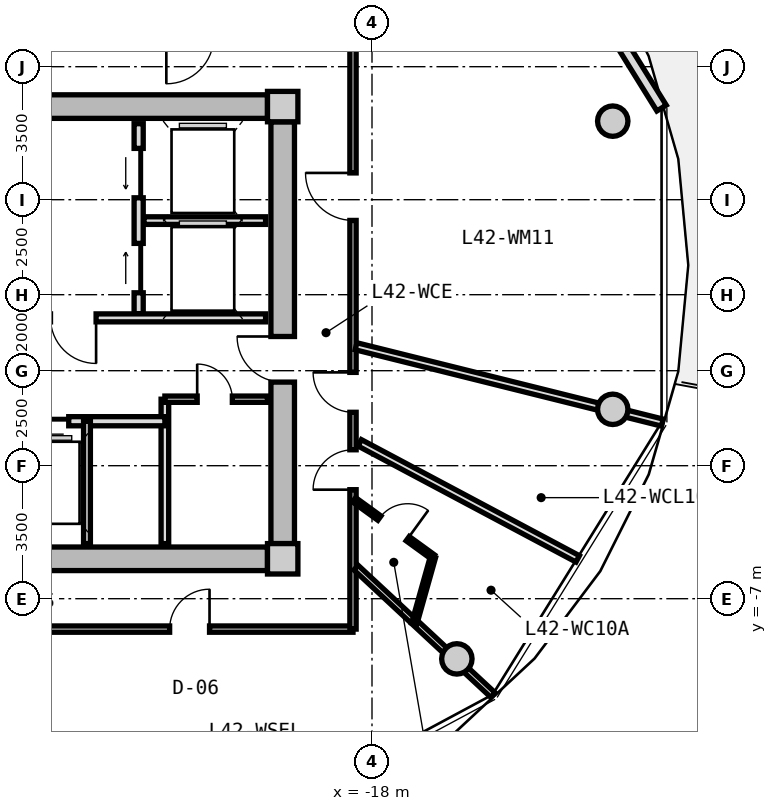
"""IFC4 building model, lengths in metres.
Left out: names, types, materials, properties, quantities, classifications, styles, units other than length and angle.
Written with IfcOpenShell. Run it as: python <this file> out.ifc"""

import sys

from ifc_helpers import new_model, si_unit, direction, frame, frame_2d, origin, origin_2d, place, context, subcontext, project, spatial, rectangle, circle, extrude, source, transform, mapped, element, fill, save


model = new_model("IFC4")
c1 = context("Model", 3, precision=1e-05, world=origin(), true_north=direction((0.0, 1.0)))
c2 = subcontext(c1, "Body", "Model", "MODEL_VIEW")
j1 = project(units=[si_unit("LENGTHUNIT", "METRE"), si_unit("PLANEANGLEUNIT", "RADIAN")], contexts=[c1])
p1 = place(None, origin())
s1 = spatial("IfcSite", under=j1, at=p1, CompositionType="ELEMENT")
p2 = place(p1, origin())
s2 = spatial("IfcBuilding", under=s1, at=p2, CompositionType="ELEMENT")
p3 = place(p2, frame((0.0, 0.0, 137.35)))
s3 = spatial("IfcBuildingStorey", under=s2, at=p3, CompositionType="ELEMENT", Elevation=137.35)
m1 = source(origin(), c2, "Body", "SweptSolid", [
    extrude(rectangle(XDim=0.8, YDim=0.8, at=origin_2d()), origin(), (0.0, 0.0, 1.0), 3.05),
])
for number, where, z_axis, x_axis in (
    (1, (-20.35, -5.95, 0.0), (0.0, 0.0, 1.0), (1.0, 0.0, 0.0)),
    (2, (-20.35, 5.95, 0.0), (0.0, 0.0, 1.0), (1.0, 0.0, 0.0)),
):
    element("IfcColumn", number, at=place(p3, frame(where, z_axis=z_axis, x_axis=x_axis)), inside=s3, PredefinedType="COLUMN", context=c2, shape_type="MappedRepresentation", body=[
        mapped(m1, transform((0.0, 0.0, 0.0), x_axis=(1.0, 0.0, 0.0), y_axis=(0.0, 1.0, 0.0), z_axis=(0.0, 0.0, 1.0), scale=1.0)),
    ])
m2 = source(origin(), c2, "Body", "SweptSolid", [
    extrude(rectangle(XDim=14.5, YDim=0.62, at=frame_2d((7.25, 0.0))), origin(), (0.0, 0.0, 1.0), 2.81),
])
for number, where, z_axis, x_axis in (
    (3, (-35.25, 5.95, 0.0), (0.0, 0.0, 1.0), (1.0, 0.0, 0.0)),
    (4, (-20.75, -5.95, 0.0), (0.0, 0.0, 1.0), (-1.0, 0.0, 0.0)),
):
    element("IfcWall", number, at=place(p3, frame(where, z_axis=z_axis, x_axis=x_axis)), inside=s3, PredefinedType="SHEAR", context=c2, shape_type="MappedRepresentation", body=[
        mapped(m2, transform((0.0, 0.0, 0.0), x_axis=(1.0, 0.0, 0.0), y_axis=(0.0, 1.0, 0.0), z_axis=(0.0, 0.0, 1.0), scale=1.0)),
    ])
m3 = source(origin(), c2, "Body", "SweptSolid", [
    extrude(rectangle(XDim=11.1, YDim=0.62, at=frame_2d((5.55, 0.0))), origin(), (0.0, 0.0, 1.0), 2.81),
])
p4 = place(p3, frame((-20.35, 5.55, 0.0), z_axis=(0.0, 0.0, 1.0), x_axis=(0.0, -1.0, 0.0)))
e5 = element("IfcWall", 5, at=p4, inside=s3, PredefinedType="SHEAR", context=c2, shape_type="MappedRepresentation", body=[
    mapped(m3, transform((0.0, 0.0, 0.0), x_axis=(1.0, 0.0, 0.0), y_axis=(0.0, 1.0, 0.0), z_axis=(0.0, 0.0, 1.0), scale=1.0)),
])
p5 = place(p4, frame((5.65, 0.0, 0.0)))
e6 = element("IfcOpeningElement", 6, at=p5, cuts=e5, PredefinedType="OPENING", context=c2, shape_type="SweptSolid", body=[
    extrude(rectangle(XDim=1.2, YDim=2.15, at=frame_2d((0.6, 1.075))), frame((0.0, 0.32, 0.0), z_axis=(0.0, -1.0, 0.0), x_axis=(1.0, 0.0, 0.0)), (0.0, 0.0, 1.0), 0.64),
])
m4 = source(origin(), c2, "Body", "SweptSolid", [
    extrude(circle(Radius=0.4, at=origin_2d()), origin(), (0.0, 0.0, 1.0), 3.05),
])
for number, where, z_axis, x_axis in (
    (7, (-11.665, 5.567, 0.0), (0.0, 0.0, 1.0), (1.0, 0.0, 0.0)),
    (8, (-15.767, -8.584, 0.0), (0.0, 0.0, 1.0), (1.0, 0.0, 0.0)),
    (9, (-11.665, -2.016, 0.0), (0.0, 0.0, 1.0), (1.0, 0.0, 0.0)),
):
    element("IfcColumn", number, at=place(p3, frame(where, z_axis=z_axis, x_axis=x_axis)), inside=s3, PredefinedType="COLUMN", context=c2, shape_type="MappedRepresentation", body=[
        mapped(m4, transform((0.0, 0.0, 0.0), x_axis=(1.0, 0.0, 0.0), y_axis=(0.0, 1.0, 0.0), z_axis=(0.0, 0.0, 1.0), scale=1.0)),
    ])
m5 = source(origin(), c2, "Body", "SweptSolid", [
    extrude(rectangle(XDim=8.431, YDim=0.29, at=frame_2d((4.216, 0.0))), origin(), (0.0, 0.0, 1.0), 2.81),
])
p6 = place(p3, frame((-14.827, 13.075, 0.0), z_axis=(0.0, 0.0, 1.0), x_axis=(0.527377998418, -0.849630770855, 0.0)))
e10 = element("IfcWall", 10, at=p6, inside=s3, PredefinedType="SOLIDWALL", context=c2, shape_type="MappedRepresentation", body=[
    mapped(m5, transform((0.0, 0.0, 0.0), x_axis=(1.0, 0.0, 0.0), y_axis=(0.0, 1.0, 0.0), z_axis=(0.0, 0.0, 1.0), scale=1.0)),
])
p7 = place(p6, frame((0.9, 0.0, 0.0)))
e11 = element("IfcOpeningElement", 11, at=p7, cuts=e10, PredefinedType="OPENING", context=c2, shape_type="SweptSolid", body=[
    extrude(rectangle(XDim=1.15, YDim=2.25, at=frame_2d((0.575, 1.125))), frame((0.0, 0.155, 0.0), z_axis=(0.0, -1.0, 0.0), x_axis=(1.0, 0.0, 0.0)), (0.0, 0.0, 1.0), 0.31),
])
p8 = place(p6, frame((4.566, 0.0, 0.85)))
e12 = element("IfcOpeningElement", 12, at=p8, cuts=e10, PredefinedType="OPENING", context=c2, shape_type="SweptSolid", body=[
    extrude(rectangle(XDim=1.2, YDim=1.5, at=frame_2d((0.6, 0.75))), frame((0.0, 0.155, 0.0), z_axis=(0.0, -1.0, 0.0), x_axis=(1.0, 0.0, 0.0)), (0.0, 0.0, 1.0), 0.31),
])
m6 = source(origin(), c2, "Body", "SweptSolid", [
    extrude(rectangle(XDim=5.0, YDim=0.24, at=frame_2d((2.5, 0.0))), origin(), (0.0, 0.0, 1.0), 2.795),
])
p9 = place(p3, frame((-24.14, 0.5, 0.0), z_axis=(0.0, 0.0, 1.0), x_axis=(0.0, 1.0, 0.0)))
e13 = element("IfcWall", 13, at=p9, inside=s3, PredefinedType="PARTITIONING", context=c2, shape_type="MappedRepresentation", body=[
    mapped(m6, transform((0.0, 0.0, 0.0), x_axis=(1.0, 0.0, 0.0), y_axis=(0.0, 1.0, 0.0), z_axis=(0.0, 0.0, 1.0), scale=1.0)),
])
p10 = place(p9, frame((3.05, 0.0, 0.0)))
e14 = element("IfcOpeningElement", 14, at=p10, cuts=e13, PredefinedType="OPENING", context=c2, shape_type="SweptSolid", body=[
    extrude(rectangle(XDim=1.3, YDim=2.2, at=frame_2d((0.65, 1.1))), frame((0.0, 0.13, 0.0), z_axis=(0.0, -1.0, 0.0), x_axis=(1.0, 0.0, 0.0)), (0.0, 0.0, 1.0), 0.26),
])
p11 = place(p9, frame((0.55, 0.0, 0.0)))
e15 = element("IfcOpeningElement", 15, at=p11, cuts=e13, PredefinedType="OPENING", context=c2, shape_type="SweptSolid", body=[
    extrude(rectangle(XDim=1.3, YDim=2.2, at=frame_2d((0.65, 1.1))), frame((0.0, 0.13, 0.0), z_axis=(0.0, -1.0, 0.0), x_axis=(1.0, 0.0, 0.0)), (0.0, 0.0, 1.0), 0.26),
])
m7 = source(origin(), c2, "Body", "SweptSolid", [
    extrude(rectangle(XDim=3.2, YDim=0.2, at=frame_2d((1.6, 0.0))), origin(), (0.0, 0.0, 1.0), 2.795),
])
p12 = place(p3, frame((-24.0, 2.95, 0.0), z_axis=(0.0, 0.0, 1.0), x_axis=(1.0, 0.0, 0.0)))
e16 = element("IfcWall", 16, at=p12, inside=s3, PredefinedType="PARTITIONING", context=c2, shape_type="MappedRepresentation", body=[
    mapped(m7, transform((0.0, 0.0, 0.0), x_axis=(1.0, 0.0, 0.0), y_axis=(0.0, 1.0, 0.0), z_axis=(0.0, 0.0, 1.0), scale=1.0)),
])
m8 = source(origin(), c2, "Body", "SweptSolid", [
    extrude(rectangle(XDim=6.66, YDim=0.21, at=frame_2d((3.33, 0.0))), origin(), (0.0, 0.0, 1.0), 2.795),
])
p13 = place(p3, frame((-27.46, 0.39, 0.0), z_axis=(0.0, 0.0, 1.0), x_axis=(1.0, 0.0, 0.0)))
e17 = element("IfcWall", 17, at=p13, inside=s3, PredefinedType="PARTITIONING", context=c2, shape_type="MappedRepresentation", body=[
    mapped(m8, transform((0.0, 0.0, 0.0), x_axis=(1.0, 0.0, 0.0), y_axis=(0.0, 1.0, 0.0), z_axis=(0.0, 0.0, 1.0), scale=1.0)),
])
p14 = place(p13, frame((1.0, 0.0, 0.0)))
e18 = element("IfcOpeningElement", 18, at=p14, cuts=e17, PredefinedType="OPENING", context=c2, shape_type="SweptSolid", body=[
    extrude(rectangle(XDim=1.2, YDim=2.15, at=frame_2d((0.6, 1.075))), frame((0.0, 0.115, 0.0), z_axis=(0.0, -1.0, 0.0), x_axis=(1.0, 0.0, 0.0)), (0.0, 0.0, 1.0), 0.23),
])
m9 = source(origin(), c2, "Body", "SweptSolid", [
    extrude(rectangle(XDim=3.8, YDim=0.2, at=frame_2d((1.9, 0.0))), origin(), (0.0, 0.0, 1.0), 2.795),
])
p15 = place(p3, frame((-23.45, -5.55, 0.0), z_axis=(0.0, 0.0, 1.0), x_axis=(0.0, 1.0, 0.0)))
e19 = element("IfcWall", 19, at=p15, inside=s3, PredefinedType="PARTITIONING", context=c2, shape_type="MappedRepresentation", body=[
    mapped(m9, transform((0.0, 0.0, 0.0), x_axis=(1.0, 0.0, 0.0), y_axis=(0.0, 1.0, 0.0), z_axis=(0.0, 0.0, 1.0), scale=1.0)),
])
m10 = source(origin(), c2, "Body", "SweptSolid", [
    extrude(rectangle(XDim=4.13, YDim=0.24, at=frame_2d((2.065, 0.0))), origin(), (0.0, 0.0, 1.0), 2.795),
])
p16 = place(p3, frame((-27.58, -2.33, 0.0), z_axis=(0.0, 0.0, 1.0), x_axis=(1.0, 0.0, 0.0)))
e20 = element("IfcWall", 20, at=p16, inside=s3, PredefinedType="PARTITIONING", context=c2, shape_type="MappedRepresentation", body=[
    mapped(m10, transform((0.0, 0.0, 0.0), x_axis=(1.0, 0.0, 0.0), y_axis=(0.0, 1.0, 0.0), z_axis=(0.0, 0.0, 1.0), scale=1.0)),
])
p17 = place(p16, frame((0.5, 0.0, 0.0)))
e21 = element("IfcOpeningElement", 21, at=p17, cuts=e20, PredefinedType="OPENING", context=c2, shape_type="SweptSolid", body=[
    extrude(rectangle(XDim=1.1, YDim=2.2, at=frame_2d((0.55, 1.1))), frame((0.0, 0.13, 0.0), z_axis=(0.0, -1.0, 0.0), x_axis=(1.0, 0.0, 0.0)), (0.0, 0.0, 1.0), 0.26),
])
m11 = source(origin(), c2, "Body", "SweptSolid", [
    extrude(rectangle(XDim=3.22, YDim=0.18, at=frame_2d((1.61, 0.0))), origin(), (0.0, 0.0, 1.0), 2.795),
])
p18 = place(p3, frame((-25.5, -5.55, 0.0), z_axis=(0.0, 0.0, 1.0), x_axis=(0.0, 1.0, 0.0)))
e22 = element("IfcWall", 22, at=p18, inside=s3, PredefinedType="PARTITIONING", context=c2, shape_type="MappedRepresentation", body=[
    mapped(m11, transform((0.0, 0.0, 0.0), x_axis=(1.0, 0.0, 0.0), y_axis=(0.0, 1.0, 0.0), z_axis=(0.0, 0.0, 1.0), scale=1.0)),
])
m12 = source(origin(), c2, "Body", "SweptSolid", [
    extrude(rectangle(XDim=2.7, YDim=0.165, at=frame_2d((1.35, 0.0))), origin(), (0.0, 0.0, 1.0), 2.795),
])
p19 = place(p3, frame((-23.45, -1.75, 0.0), z_axis=(0.0, 0.0, 1.0), x_axis=(1.0, 0.0, 0.0)))
e23 = element("IfcWall", 23, at=p19, inside=s3, PredefinedType="PARTITIONING", context=c2, shape_type="MappedRepresentation", body=[
    mapped(m12, transform((0.0, 0.0, 0.0), x_axis=(1.0, 0.0, 0.0), y_axis=(0.0, 1.0, 0.0), z_axis=(0.0, 0.0, 1.0), scale=1.0)),
])
p20 = place(p19, frame((0.85, 0.0, 0.0)))
e24 = element("IfcOpeningElement", 24, at=p20, cuts=e23, PredefinedType="OPENING", context=c2, shape_type="SweptSolid", body=[
    extrude(rectangle(XDim=0.925, YDim=2.1, at=frame_2d((0.462, 1.05))), frame((0.0, 0.093, 0.0), z_axis=(0.0, -1.0, 0.0), x_axis=(1.0, 0.0, 0.0)), (0.0, 0.0, 1.0), 0.185),
])
m13 = source(origin(), c2, "Body", "SweptSolid", [
    extrude(rectangle(XDim=8.6, YDim=0.165, at=frame_2d((4.3, 0.0))), origin(), (0.0, 0.0, 1.0), 2.795),
])
p21 = place(p3, frame((-18.5, -7.8, 0.0), z_axis=(0.0, 0.0, 1.0), x_axis=(-1.0, 0.0, 0.0)))
e25 = element("IfcWall", 25, at=p21, inside=s3, PredefinedType="PARTITIONING", context=c2, shape_type="MappedRepresentation", body=[
    mapped(m13, transform((0.0, 0.0, 0.0), x_axis=(1.0, 0.0, 0.0), y_axis=(0.0, 1.0, 0.0), z_axis=(0.0, 0.0, 1.0), scale=1.0)),
])
p22 = place(p21, frame((3.775, 0.0, 0.0)))
e26 = element("IfcOpeningElement", 26, at=p22, cuts=e25, PredefinedType="OPENING", context=c2, shape_type="SweptSolid", body=[
    extrude(rectangle(XDim=1.05, YDim=2.15, at=frame_2d((0.525, 1.075))), frame((0.0, 0.093, 0.0), z_axis=(0.0, -1.0, 0.0), x_axis=(1.0, 0.0, 0.0)), (0.0, 0.0, 1.0), 0.185),
])
m14 = source(origin(), c2, "Body", "SweptSolid", [
    extrude(rectangle(XDim=15.6, YDim=0.165, at=frame_2d((7.8, 0.0))), origin(), (0.0, 0.0, 1.0), 2.795),
])
p23 = place(p3, frame((-18.5, 7.8, 0.0), z_axis=(0.0, 0.0, 1.0), x_axis=(0.0, -1.0, 0.0)))
e27 = element("IfcWall", 27, at=p23, inside=s3, PredefinedType="PARTITIONING", context=c2, shape_type="MappedRepresentation", body=[
    mapped(m14, transform((0.0, 0.0, 0.0), x_axis=(1.0, 0.0, 0.0), y_axis=(0.0, 1.0, 0.0), z_axis=(0.0, 0.0, 1.0), scale=1.0)),
])
p24 = place(p23, frame((10.881, 0.0, 0.0)))
e28 = element("IfcOpeningElement", 28, at=p24, cuts=e27, PredefinedType="OPENING", context=c2, shape_type="SweptSolid", body=[
    extrude(rectangle(XDim=1.05, YDim=2.15, at=frame_2d((0.525, 1.075))), frame((0.0, 0.093, 0.0), z_axis=(0.0, -1.0, 0.0), x_axis=(1.0, 0.0, 0.0)), (0.0, 0.0, 1.0), 0.185),
])
p25 = place(p23, frame((8.844, 0.0, 0.0)))
e29 = element("IfcOpeningElement", 29, at=p25, cuts=e27, PredefinedType="OPENING", context=c2, shape_type="SweptSolid", body=[
    extrude(rectangle(XDim=1.05, YDim=2.15, at=frame_2d((0.525, 1.075))), frame((0.0, 0.093, 0.0), z_axis=(0.0, -1.0, 0.0), x_axis=(1.0, 0.0, 0.0)), (0.0, 0.0, 1.0), 0.185),
])
p26 = place(p23, frame((3.596, 0.0, 0.0)))
e30 = element("IfcOpeningElement", 30, at=p26, cuts=e27, PredefinedType="OPENING", context=c2, shape_type="SweptSolid", body=[
    extrude(rectangle(XDim=1.25, YDim=2.2, at=frame_2d((0.625, 1.1))), frame((0.0, 0.093, 0.0), z_axis=(0.0, -1.0, 0.0), x_axis=(1.0, 0.0, 0.0)), (0.0, 0.0, 1.0), 0.185),
])
m15 = source(origin(), c2, "Body", "SweptSolid", [
    extrude(rectangle(XDim=4.927, YDim=0.165, at=frame_2d((2.463, 0.0))), origin(), (0.0, 0.0, 1.0), 2.345),
])
p27 = place(p3, frame((-18.42, -6.183, 0.0), z_axis=(0.0, 0.0, 1.0), x_axis=(0.732191335987, -0.681098999783, 0.0)))
e31 = element("IfcWall", 31, at=p27, inside=s3, PredefinedType="PARTITIONING", context=c2, shape_type="MappedRepresentation", body=[
    mapped(m15, transform((0.0, 0.0, 0.0), x_axis=(1.0, 0.0, 0.0), y_axis=(0.0, 1.0, 0.0), z_axis=(0.0, 0.0, 1.0), scale=1.0)),
])
m16 = source(origin(), c2, "Body", "SweptSolid", [
    extrude(rectangle(XDim=8.305, YDim=0.19, at=frame_2d((4.153, 0.0))), origin(), (0.0, 0.0, 1.0), 2.345),
])
p28 = place(p3, frame((-18.42, -0.357, 0.0), z_axis=(0.0, 0.0, 1.0), x_axis=(0.970309994378, -0.241864662175, 0.0)))
e32 = element("IfcWall", 32, at=p28, inside=s3, PredefinedType="PARTITIONING", context=c2, shape_type="MappedRepresentation", body=[
    mapped(m16, transform((0.0, 0.0, 0.0), x_axis=(1.0, 0.0, 0.0), y_axis=(0.0, 1.0, 0.0), z_axis=(0.0, 0.0, 1.0), scale=1.0)),
])
m17 = source(origin(), c2, "Body", "SweptSolid", [
    extrude(rectangle(XDim=6.499, YDim=0.19, at=frame_2d((3.25, 0.0))), origin(), (0.0, 0.0, 1.0), 2.795),
])
p29 = place(p3, frame((-18.324, -2.898, 0.0), z_axis=(0.0, 0.0, 1.0), x_axis=(0.882700013711, -0.469936895545, 0.0)))
e33 = element("IfcWall", 33, at=p29, inside=s3, PredefinedType="PARTITIONING", context=c2, shape_type="MappedRepresentation", body=[
    mapped(m17, transform((0.0, 0.0, 0.0), x_axis=(1.0, 0.0, 0.0), y_axis=(0.0, 1.0, 0.0), z_axis=(0.0, 0.0, 1.0), scale=1.0)),
])
m18 = source(origin(), c2, "Body", "SweptSolid", [
    extrude(rectangle(XDim=2.563, YDim=0.14, at=frame_2d((1.282, 0.0))), origin(), (0.0, 0.0, 1.0), 2.795),
])
p30 = place(p3, frame((-18.47, -4.397, 0.0), z_axis=(0.0, 0.0, 1.0), x_axis=(0.809308208957, -0.587384220859, 0.0)))
e34 = element("IfcWall", 34, at=p30, inside=s3, PredefinedType="PARTITIONING", context=c2, shape_type="MappedRepresentation", body=[
    mapped(m18, transform((0.0, 0.0, 0.0), x_axis=(1.0, 0.0, 0.0), y_axis=(0.0, 1.0, 0.0), z_axis=(0.0, 0.0, 1.0), scale=1.0)),
])
p31 = place(p30, frame((0.822, 0.0, 0.0)))
e35 = element("IfcOpeningElement", 35, at=p31, cuts=e34, PredefinedType="OPENING", context=c2, shape_type="SweptSolid", body=[
    extrude(rectangle(XDim=0.92, YDim=2.1, at=frame_2d((0.46, 1.05))), frame((0.0, 0.08, 0.0), z_axis=(0.0, -1.0, 0.0), x_axis=(1.0, 0.0, 0.0)), (0.0, 0.0, 1.0), 0.16),
])
m19 = source(origin(), c2, "Body", "SweptSolid", [
    extrude(rectangle(XDim=1.826, YDim=0.14, at=frame_2d((0.913, 0.0))), origin(), (0.0, 0.0, 1.0), 2.435),
])
p32 = place(p3, frame((-16.396, -5.903, 0.0), z_axis=(0.0, 0.0, 1.0), x_axis=(-0.270745576918, -0.962650940154, 0.0)))
e36 = element("IfcWall", 36, at=p32, inside=s3, PredefinedType="PARTITIONING", context=c2, shape_type="MappedRepresentation", body=[
    mapped(m19, transform((0.0, 0.0, 0.0), x_axis=(1.0, 0.0, 0.0), y_axis=(0.0, 1.0, 0.0), z_axis=(0.0, 0.0, 1.0), scale=1.0)),
])
m20 = source(origin(), c2, "Body", "SweptSolid", [
    extrude(rectangle(XDim=1.3, YDim=2.2, at=frame_2d((0.65, 1.1))), frame((0.0, 0.025, 0.0), z_axis=(0.0, -1.0, 0.0), x_axis=(1.0, 0.0, 0.0)), (0.0, 0.0, 1.0), 0.05),
])
p33 = place(p10, origin())
e37 = element("IfcDoor", 37, at=p33, inside=s3, OperationType="SLIDING_TO_LEFT", PredefinedType="DOOR", context=c2, shape_type="MappedRepresentation", body=[
    mapped(m20, transform((0.0, 0.0, 0.0), x_axis=(1.0, 0.0, 0.0), y_axis=(0.0, 1.0, 0.0), z_axis=(0.0, 0.0, 1.0), scale=1.0)),
])
fill(e14, e37)
p34 = place(p11, origin())
e38 = element("IfcDoor", 38, at=p34, inside=s3, OperationType="SLIDING_TO_RIGHT", PredefinedType="DOOR", context=c2, shape_type="MappedRepresentation", body=[
    mapped(m20, transform((0.0, 0.0, 0.0), x_axis=(1.0, 0.0, 0.0), y_axis=(0.0, 1.0, 0.0), z_axis=(0.0, 0.0, 1.0), scale=1.0)),
])
fill(e15, e38)
m21 = source(origin(), c2, "Body", "SweptSolid", [
    extrude(rectangle(XDim=1.2, YDim=2.15, at=frame_2d((0.6, 1.075))), frame((0.0, 0.025, 0.0), z_axis=(0.0, -1.0, 0.0), x_axis=(1.0, 0.0, 0.0)), (0.0, 0.0, 1.0), 0.05),
])
p35 = place(p14, frame((1.2, 0.0, 0.0), z_axis=(0.0, 0.0, 1.0), x_axis=(-1.0, 0.0, 0.0)))
e39 = element("IfcDoor", 39, at=p35, inside=s3, OperationType="SINGLE_SWING_LEFT", PredefinedType="DOOR", context=c2, shape_type="MappedRepresentation", body=[
    mapped(m21, transform((0.0, 0.0, 0.0), x_axis=(1.0, 0.0, 0.0), y_axis=(0.0, 1.0, 0.0), z_axis=(0.0, 0.0, 1.0), scale=1.0)),
])
fill(e18, e39)
p36 = place(p5, frame((1.2, 0.0, 0.0), z_axis=(0.0, 0.0, 1.0), x_axis=(-1.0, 0.0, 0.0)))
e40 = element("IfcDoor", 40, at=p36, inside=s3, OperationType="SINGLE_SWING_RIGHT", PredefinedType="DOOR", context=c2, shape_type="MappedRepresentation", body=[
    mapped(m21, transform((0.0, 0.0, 0.0), x_axis=(1.0, 0.0, 0.0), y_axis=(0.0, 1.0, 0.0), z_axis=(0.0, 0.0, 1.0), scale=1.0)),
])
fill(e6, e40)
m22 = source(origin(), c2, "Body", "SweptSolid", [
    extrude(rectangle(XDim=1.1, YDim=2.2, at=frame_2d((0.55, 1.1))), frame((0.0, 0.025, 0.0), z_axis=(0.0, -1.0, 0.0), x_axis=(1.0, 0.0, 0.0)), (0.0, 0.0, 1.0), 0.05),
])
p37 = place(p17, frame((1.1, 0.0, 0.0), z_axis=(0.0, 0.0, 1.0), x_axis=(-1.0, 0.0, 0.0)))
e41 = element("IfcDoor", 41, at=p37, inside=s3, OperationType="SLIDING_TO_LEFT", PredefinedType="DOOR", context=c2, shape_type="MappedRepresentation", body=[
    mapped(m22, transform((0.0, 0.0, 0.0), x_axis=(1.0, 0.0, 0.0), y_axis=(0.0, 1.0, 0.0), z_axis=(0.0, 0.0, 1.0), scale=1.0)),
])
fill(e21, e41)
m23 = source(origin(), c2, "Body", "SweptSolid", [
    extrude(rectangle(XDim=0.925, YDim=2.1, at=frame_2d((0.462, 1.05))), frame((0.0, 0.025, 0.0), z_axis=(0.0, -1.0, 0.0), x_axis=(1.0, 0.0, 0.0)), (0.0, 0.0, 1.0), 0.05),
])
p38 = place(p20, origin())
e42 = element("IfcDoor", 42, at=p38, inside=s3, OperationType="SINGLE_SWING_LEFT", PredefinedType="DOOR", context=c2, shape_type="MappedRepresentation", body=[
    mapped(m23, transform((0.0, 0.0, 0.0), x_axis=(1.0, 0.0, 0.0), y_axis=(0.0, 1.0, 0.0), z_axis=(0.0, 0.0, 1.0), scale=1.0)),
])
fill(e24, e42)
m24 = source(origin(), c2, "Body", "SweptSolid", [
    extrude(rectangle(XDim=1.05, YDim=2.15, at=frame_2d((0.525, 1.075))), frame((0.0, 0.025, 0.0), z_axis=(0.0, -1.0, 0.0), x_axis=(1.0, 0.0, 0.0)), (0.0, 0.0, 1.0), 0.05),
])
p39 = place(p22, frame((1.05, 0.0, 0.0), z_axis=(0.0, 0.0, 1.0), x_axis=(-1.0, 0.0, 0.0)))
e43 = element("IfcDoor", 43, at=p39, inside=s3, OperationType="SINGLE_SWING_RIGHT", PredefinedType="DOOR", context=c2, shape_type="MappedRepresentation", body=[
    mapped(m24, transform((0.0, 0.0, 0.0), x_axis=(1.0, 0.0, 0.0), y_axis=(0.0, 1.0, 0.0), z_axis=(0.0, 0.0, 1.0), scale=1.0)),
])
fill(e26, e43)
p40 = place(p24, frame((1.05, 0.0, 0.0), z_axis=(0.0, 0.0, 1.0), x_axis=(-1.0, 0.0, 0.0)))
e44 = element("IfcDoor", 44, at=p40, inside=s3, OperationType="SINGLE_SWING_LEFT", PredefinedType="DOOR", context=c2, shape_type="MappedRepresentation", body=[
    mapped(m24, transform((0.0, 0.0, 0.0), x_axis=(1.0, 0.0, 0.0), y_axis=(0.0, 1.0, 0.0), z_axis=(0.0, 0.0, 1.0), scale=1.0)),
])
fill(e28, e44)
m25 = source(origin(), c2, "Body", "SweptSolid", [
    extrude(rectangle(XDim=0.92, YDim=2.1, at=frame_2d((0.46, 1.05))), frame((0.0, 0.025, 0.0), z_axis=(0.0, -1.0, 0.0), x_axis=(1.0, 0.0, 0.0)), (0.0, 0.0, 1.0), 0.05),
])
p41 = place(p31, origin())
e45 = element("IfcDoor", 45, at=p41, inside=s3, OperationType="SINGLE_SWING_RIGHT", PredefinedType="DOOR", context=c2, shape_type="MappedRepresentation", body=[
    mapped(m25, transform((0.0, 0.0, 0.0), x_axis=(1.0, 0.0, 0.0), y_axis=(0.0, 1.0, 0.0), z_axis=(0.0, 0.0, 1.0), scale=1.0)),
])
fill(e35, e45)
p42 = place(p25, frame((1.05, 0.0, 0.0), z_axis=(0.0, 0.0, 1.0), x_axis=(-1.0, 0.0, 0.0)))
e46 = element("IfcDoor", 46, at=p42, inside=s3, OperationType="SINGLE_SWING_RIGHT", PredefinedType="DOOR", context=c2, shape_type="MappedRepresentation", body=[
    mapped(m24, transform((0.0, 0.0, 0.0), x_axis=(1.0, 0.0, 0.0), y_axis=(0.0, 1.0, 0.0), z_axis=(0.0, 0.0, 1.0), scale=1.0)),
])
fill(e29, e46)
m26 = source(origin(), c2, "Body", "SweptSolid", [
    extrude(rectangle(XDim=1.25, YDim=2.2, at=frame_2d((0.625, 1.1))), frame((0.0, 0.025, 0.0), z_axis=(0.0, -1.0, 0.0), x_axis=(1.0, 0.0, 0.0)), (0.0, 0.0, 1.0), 0.05),
])
p43 = place(p26, frame((1.25, 0.0, 0.0), z_axis=(0.0, 0.0, 1.0), x_axis=(-1.0, 0.0, 0.0)))
e47 = element("IfcDoor", 47, at=p43, inside=s3, OperationType="SINGLE_SWING_RIGHT", PredefinedType="DOOR", context=c2, shape_type="MappedRepresentation", body=[
    mapped(m26, transform((0.0, 0.0, 0.0), x_axis=(1.0, 0.0, 0.0), y_axis=(0.0, 1.0, 0.0), z_axis=(0.0, 0.0, 1.0), scale=1.0)),
])
fill(e30, e47)
save(model, sys.argv[1])
